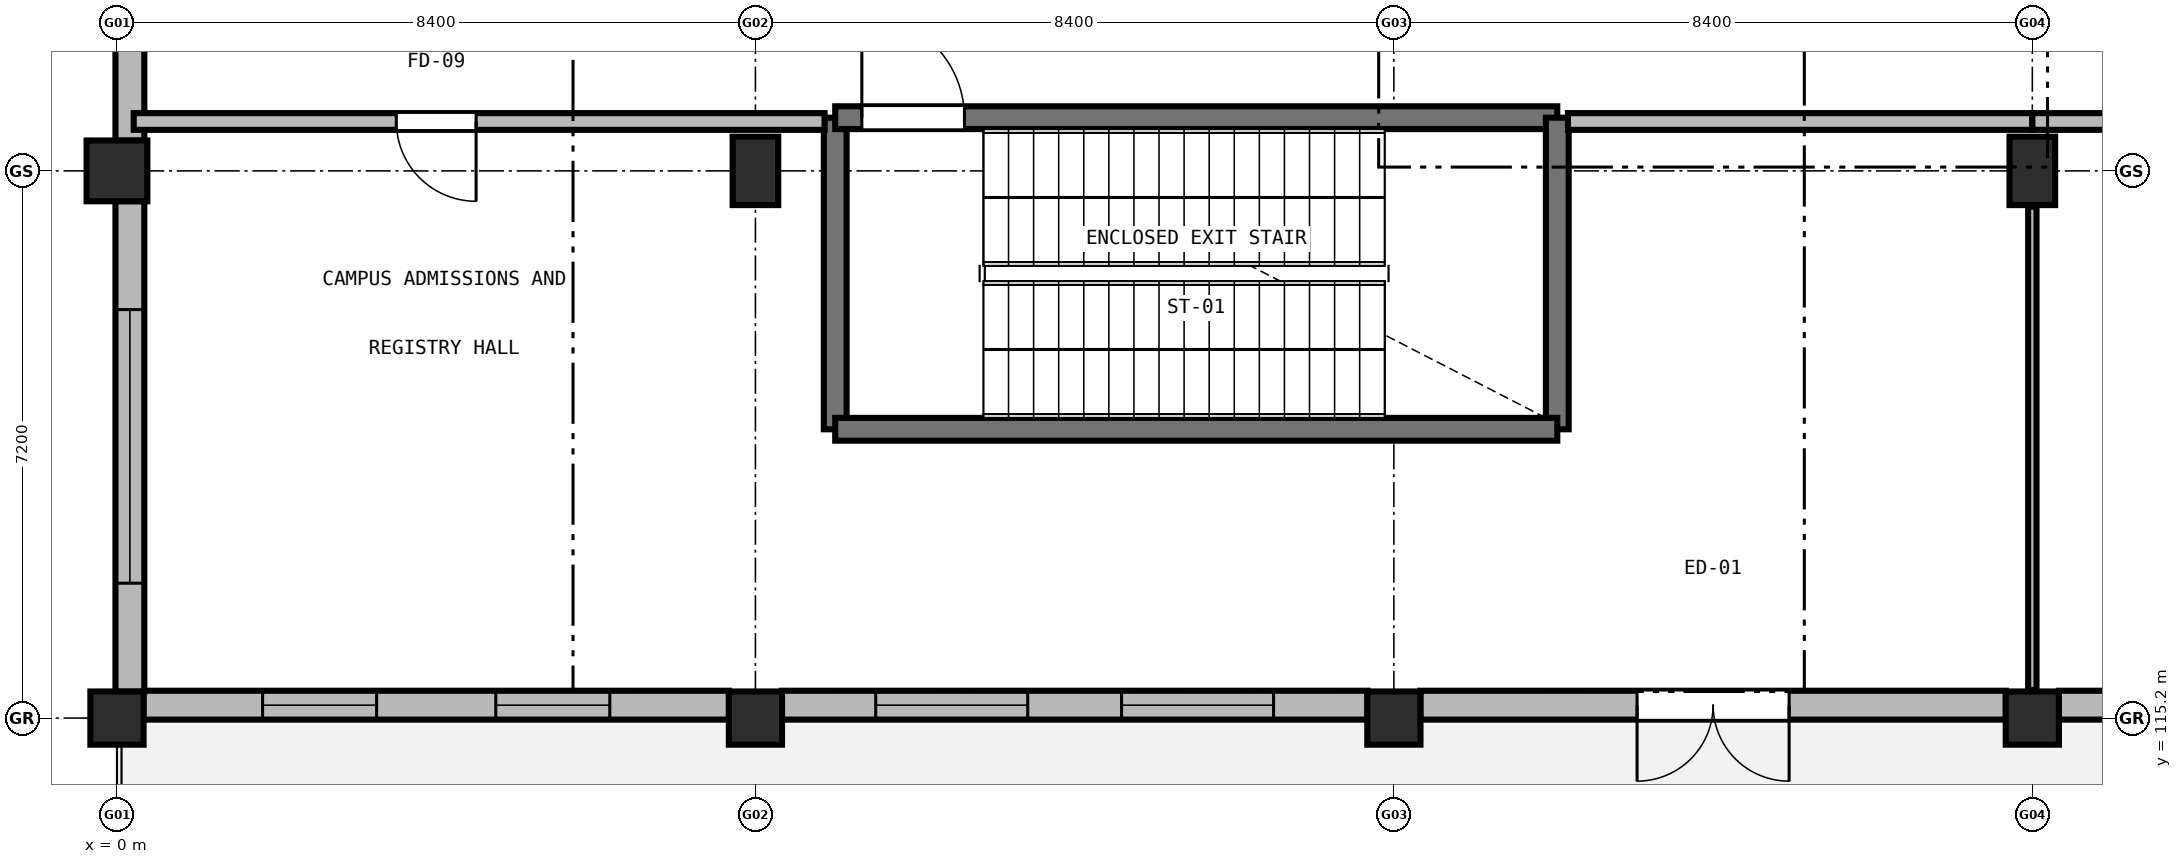
"""IFC4 building model, lengths in metres.
Left out: names, types, materials, properties, quantities, classifications, styles, units other than length and angle.
Written with IfcOpenShell. Run it as: python <this file> out.ifc"""

import sys

from ifc_helpers import new_model, si_unit, direction, frame, frame_2d, origin, origin_2d, place, context, subcontext, project, spatial, rectangle, extrude, element, fill, save


model = new_model("IFC4")
c1 = context("Model", 3, precision=1e-05, world=origin(), true_north=direction((0.0, 1.0)))
c2 = subcontext(c1, "Body", "Model", "MODEL_VIEW")
j1 = project(units=[si_unit("LENGTHUNIT", "METRE"), si_unit("PLANEANGLEUNIT", "RADIAN")], contexts=[c1])
p1 = place(None, origin())
s1 = spatial("IfcSite", under=j1, at=p1, CompositionType="ELEMENT")
p2 = place(p1, origin())
s2 = spatial("IfcBuilding", under=s1, at=p2, CompositionType="ELEMENT")
p3 = place(p2, origin())
s3 = spatial("IfcBuildingStorey", under=s2, at=p3, CompositionType="ELEMENT", Elevation=0.0)
p4 = place(p3, frame((0.0, 115.2, 0.0), z_axis=(0.0, 0.0, 1.0), x_axis=(1.0, 0.0, 0.0)))
e1 = element("IfcColumn", 1, at=p4, inside=s3, PredefinedType="COLUMN", context=c2, shape_type="SweptSolid", body=[
    extrude(rectangle(XDim=0.7, YDim=0.7, at=origin_2d()), origin(), (0.0, 0.0, 1.0), 5.1),
])
p5 = place(p3, frame((0.0, 122.4, 0.0), z_axis=(0.0, 0.0, 1.0), x_axis=(1.0, 0.0, 0.0)))
e2 = element("IfcColumn", 2, at=p5, inside=s3, PredefinedType="COLUMN", context=c2, shape_type="SweptSolid", body=[
    extrude(rectangle(XDim=0.8, YDim=0.8, at=origin_2d()), origin(), (0.0, 0.0, 1.0), 5.1),
])
p6 = place(p3, frame((8.4, 115.2, 0.0), z_axis=(0.0, 0.0, 1.0), x_axis=(1.0, 0.0, 0.0)))
e3 = element("IfcColumn", 3, at=p6, inside=s3, PredefinedType="COLUMN", context=c2, shape_type="SweptSolid", body=[
    extrude(rectangle(XDim=0.7, YDim=0.7, at=origin_2d()), origin(), (0.0, 0.0, 1.0), 5.1),
])
p7 = place(p3, frame((8.4, 122.4, 0.0), z_axis=(0.0, 0.0, 1.0), x_axis=(1.0, 0.0, 0.0)))
e4 = element("IfcColumn", 4, at=p7, inside=s3, PredefinedType="COLUMN", context=c2, shape_type="SweptSolid", body=[
    extrude(rectangle(XDim=0.6, YDim=0.9, at=origin_2d()), origin(), (0.0, 0.0, 1.0), 5.1),
])
for number, where, z_axis, x_axis in (
    (5, (16.8, 115.2, 0.0), (0.0, 0.0, 1.0), (1.0, 0.0, 0.0)),
    (6, (25.2, 115.2, 0.0), (0.0, 0.0, 1.0), (1.0, 0.0, 0.0)),
):
    element("IfcColumn", number, at=place(p3, frame(where, z_axis=z_axis, x_axis=x_axis)), inside=s3, PredefinedType="COLUMN", context=c2, shape_type="SweptSolid", body=[
        extrude(rectangle(XDim=0.7, YDim=0.7, at=origin_2d()), origin(), (0.0, 0.0, 1.0), 5.1),
    ])
p8 = place(p3, frame((25.2, 122.4, 0.0), z_axis=(0.0, 0.0, 1.0), x_axis=(1.0, 0.0, 0.0)))
e7 = element("IfcColumn", 7, at=p8, inside=s3, PredefinedType="COLUMN", context=c2, shape_type="SweptSolid", body=[
    extrude(rectangle(XDim=0.6, YDim=0.9, at=origin_2d()), origin(), (0.0, 0.0, 1.0), 5.1),
])
p9 = place(p3, frame((33.252, 115.37, 0.0), z_axis=(0.0, 0.0, 1.0), x_axis=(-1.0, 0.0, 0.0)))
e8 = element("IfcWall", 8, at=p9, inside=s3, PredefinedType="SOLIDWALL", context=c2, shape_type="SweptSolid", body=[
    extrude(rectangle(XDim=7.704, YDim=0.38, at=frame_2d((3.852, 0.0))), origin(), (0.0, 0.0, 1.0), 4.01),
])
p10 = place(p9, frame((0.85, 0.0, 0.95)))
e9 = element("IfcOpeningElement", 9, at=p10, cuts=e8, PredefinedType="OPENING", context=c2, shape_type="SweptSolid", body=[
    extrude(rectangle(XDim=2.6, YDim=1.8, at=frame_2d((1.3, 0.9))), frame((0.0, 0.2, 0.0), z_axis=(0.0, -1.0, 0.0), x_axis=(1.0, 0.0, 0.0)), (0.0, 0.0, 1.0), 0.4),
])
p11 = place(p9, frame((4.254, 0.0, 0.95)))
e10 = element("IfcOpeningElement", 10, at=p11, cuts=e8, PredefinedType="OPENING", context=c2, shape_type="SweptSolid", body=[
    extrude(rectangle(XDim=2.6, YDim=1.8, at=frame_2d((1.3, 0.9))), frame((0.0, 0.2, 0.0), z_axis=(0.0, -1.0, 0.0), x_axis=(1.0, 0.0, 0.0)), (0.0, 0.0, 1.0), 0.4),
])
p12 = place(p3, frame((24.852, 115.37, 0.0), z_axis=(0.0, 0.0, 1.0), x_axis=(-1.0, 0.0, 0.0)))
e11 = element("IfcWall", 11, at=p12, inside=s3, PredefinedType="SOLIDWALL", context=c2, shape_type="SweptSolid", body=[
    extrude(rectangle(XDim=7.704, YDim=0.38, at=frame_2d((3.852, 0.0))), origin(), (0.0, 0.0, 1.0), 4.01),
])
p13 = place(p12, frame((2.852, 0.0, 0.0)))
e12 = element("IfcOpeningElement", 12, at=p13, cuts=e11, PredefinedType="OPENING", context=c2, shape_type="SweptSolid", body=[
    extrude(rectangle(XDim=2.0, YDim=2.4, at=frame_2d((1.0, 1.2))), frame((0.0, 0.2, 0.0), z_axis=(0.0, -1.0, 0.0), x_axis=(1.0, 0.0, 0.0)), (0.0, 0.0, 1.0), 0.4),
])
p14 = place(p3, frame((16.452, 115.37, 0.0), z_axis=(0.0, 0.0, 1.0), x_axis=(-1.0, 0.0, 0.0)))
e13 = element("IfcWall", 13, at=p14, inside=s3, PredefinedType="SOLIDWALL", context=c2, shape_type="SweptSolid", body=[
    extrude(rectangle(XDim=7.704, YDim=0.38, at=frame_2d((3.852, 0.0))), origin(), (0.0, 0.0, 1.0), 4.01),
])
p15 = place(p14, frame((1.235, 0.0, 0.95)))
e14 = element("IfcOpeningElement", 14, at=p15, cuts=e13, PredefinedType="OPENING", context=c2, shape_type="SweptSolid", body=[
    extrude(rectangle(XDim=2.0, YDim=1.5, at=frame_2d((1.0, 0.75))), frame((0.0, 0.2, 0.0), z_axis=(0.0, -1.0, 0.0), x_axis=(1.0, 0.0, 0.0)), (0.0, 0.0, 1.0), 0.4),
])
p16 = place(p14, frame((4.469, 0.0, 0.95)))
e15 = element("IfcOpeningElement", 15, at=p16, cuts=e13, PredefinedType="OPENING", context=c2, shape_type="SweptSolid", body=[
    extrude(rectangle(XDim=2.0, YDim=1.5, at=frame_2d((1.0, 0.75))), frame((0.0, 0.2, 0.0), z_axis=(0.0, -1.0, 0.0), x_axis=(1.0, 0.0, 0.0)), (0.0, 0.0, 1.0), 0.4),
])
p17 = place(p3, frame((8.052, 115.37, 0.0), z_axis=(0.0, 0.0, 1.0), x_axis=(-1.0, 0.0, 0.0)))
e16 = element("IfcWall", 16, at=p17, inside=s3, PredefinedType="SOLIDWALL", context=c2, shape_type="SweptSolid", body=[
    extrude(rectangle(XDim=7.704, YDim=0.38, at=frame_2d((3.852, 0.0))), origin(), (0.0, 0.0, 1.0), 4.01),
])
p18 = place(p17, frame((1.568, 0.0, 0.95)))
e17 = element("IfcOpeningElement", 17, at=p18, cuts=e16, PredefinedType="OPENING", context=c2, shape_type="SweptSolid", body=[
    extrude(rectangle(XDim=1.5, YDim=1.4, at=frame_2d((0.75, 0.7))), frame((0.0, 0.2, 0.0), z_axis=(0.0, -1.0, 0.0), x_axis=(1.0, 0.0, 0.0)), (0.0, 0.0, 1.0), 0.4),
])
p19 = place(p17, frame((4.636, 0.0, 0.95)))
e18 = element("IfcOpeningElement", 18, at=p19, cuts=e16, PredefinedType="OPENING", context=c2, shape_type="SweptSolid", body=[
    extrude(rectangle(XDim=1.5, YDim=1.4, at=frame_2d((0.75, 0.7))), frame((0.0, 0.2, 0.0), z_axis=(0.0, -1.0, 0.0), x_axis=(1.0, 0.0, 0.0)), (0.0, 0.0, 1.0), 0.4),
])
p20 = place(p3, frame((0.17, 115.548, 0.0), z_axis=(0.0, 0.0, 1.0), x_axis=(0.0, 1.0, 0.0)))
e19 = element("IfcWall", 19, at=p20, inside=s3, PredefinedType="SOLIDWALL", context=c2, shape_type="SweptSolid", body=[
    extrude(rectangle(XDim=6.454, YDim=0.38, at=frame_2d((3.227, 0.0))), origin(), (0.0, 0.0, 1.0), 4.11),
])
p21 = place(p20, frame((1.427, 0.0, 0.95)))
e20 = element("IfcOpeningElement", 20, at=p21, cuts=e19, PredefinedType="OPENING", context=c2, shape_type="SweptSolid", body=[
    extrude(rectangle(XDim=3.6, YDim=2.1, at=frame_2d((1.8, 1.05))), frame((0.0, 0.2, 0.0), z_axis=(0.0, -1.0, 0.0), x_axis=(1.0, 0.0, 0.0)), (0.0, 0.0, 1.0), 0.4),
])
p22 = place(p3, frame((0.17, 122.798, 0.0), z_axis=(0.0, 0.0, 1.0), x_axis=(0.0, 1.0, 0.0)))
e21 = element("IfcWall", 21, at=p22, inside=s3, PredefinedType="SOLIDWALL", context=c2, shape_type="SweptSolid", body=[
    extrude(rectangle(XDim=6.404, YDim=0.38, at=frame_2d((3.202, 0.0))), origin(), (0.0, 0.0, 1.0), 4.11),
])
p23 = place(p3, frame((9.45, 119.0, 0.0), z_axis=(0.0, 0.0, 1.0), x_axis=(0.0, 1.0, 0.0)))
e22 = element("IfcWall", 22, at=p23, inside=s3, PredefinedType="SHEAR", context=c2, shape_type="SweptSolid", body=[
    extrude(rectangle(XDim=4.1, YDim=0.3, at=frame_2d((2.05, 0.0))), origin(), (0.0, 0.0, 1.0), 4.82),
])
p24 = place(p3, frame((9.45, 123.1, 0.0), z_axis=(0.0, 0.0, 1.0), x_axis=(1.0, 0.0, 0.0)))
e23 = element("IfcWall", 23, at=p24, inside=s3, PredefinedType="SHEAR", context=c2, shape_type="SweptSolid", body=[
    extrude(rectangle(XDim=9.5, YDim=0.3, at=frame_2d((4.75, 0.0))), origin(), (0.0, 0.0, 1.0), 4.82),
])
p25 = place(p24, frame((0.35, 0.0, 0.0)))
e24 = element("IfcOpeningElement", 24, at=p25, cuts=e23, PredefinedType="OPENING", context=c2, shape_type="SweptSolid", body=[
    extrude(rectangle(XDim=1.35, YDim=2.2, at=frame_2d((0.675, 1.1))), frame((0.0, 0.16, 0.0), z_axis=(0.0, -1.0, 0.0), x_axis=(1.0, 0.0, 0.0)), (0.0, 0.0, 1.0), 0.32),
])
p26 = place(p3, frame((18.95, 123.1, 0.0), z_axis=(0.0, 0.0, 1.0), x_axis=(0.0, -1.0, 0.0)))
e25 = element("IfcWall", 25, at=p26, inside=s3, PredefinedType="SHEAR", context=c2, shape_type="SweptSolid", body=[
    extrude(rectangle(XDim=4.1, YDim=0.3, at=frame_2d((2.05, 0.0))), origin(), (0.0, 0.0, 1.0), 4.82),
])
p27 = place(p3, frame((18.95, 119.0, 0.0), z_axis=(0.0, 0.0, 1.0), x_axis=(-1.0, 0.0, 0.0)))
e26 = element("IfcWall", 26, at=p27, inside=s3, PredefinedType="SHEAR", context=c2, shape_type="SweptSolid", body=[
    extrude(rectangle(XDim=9.5, YDim=0.3, at=frame_2d((4.75, 0.0))), origin(), (0.0, 0.0, 1.0), 4.82),
])
p28 = place(p3, frame((25.2, 123.05, 0.0), z_axis=(0.0, 0.0, 1.0), x_axis=(-1.0, 0.0, 0.0)))
e27 = element("IfcWall", 27, at=p28, inside=s3, PredefinedType="SOLIDWALL", context=c2, shape_type="SweptSolid", body=[
    extrude(rectangle(XDim=6.11, YDim=0.22, at=frame_2d((3.055, 0.0))), origin(), (0.0, 0.0, 1.0), 4.105),
])
p29 = place(p3, frame((9.31, 123.05, 0.0), z_axis=(0.0, 0.0, 1.0), x_axis=(-1.0, 0.0, 0.0)))
e28 = element("IfcWall", 28, at=p29, inside=s3, PredefinedType="SOLIDWALL", context=c2, shape_type="SweptSolid", body=[
    extrude(rectangle(XDim=9.09, YDim=0.22, at=frame_2d((4.545, 0.0))), origin(), (0.0, 0.0, 1.0), 4.105),
])
p30 = place(p29, frame((4.585, 0.0, 0.0)))
e29 = element("IfcOpeningElement", 29, at=p30, cuts=e28, PredefinedType="OPENING", context=c2, shape_type="SweptSolid", body=[
    extrude(rectangle(XDim=1.05, YDim=2.15, at=frame_2d((0.525, 1.075))), frame((0.0, 0.12, 0.0), z_axis=(0.0, -1.0, 0.0), x_axis=(1.0, 0.0, 0.0)), (0.0, 0.0, 1.0), 0.24),
])
p31 = place(p3, frame((25.2, 115.57, 0.0), z_axis=(0.0, 0.0, 1.0), x_axis=(0.0, 1.0, 0.0)))
e30 = element("IfcWall", 30, at=p31, inside=s3, PredefinedType="PARTITIONING", context=c2, shape_type="SweptSolid", body=[
    extrude(rectangle(XDim=6.36, YDim=0.11, at=frame_2d((3.18, 0.0))), origin(), (0.0, 0.0, 1.0), 4.005),
])
p32 = place(p3, frame((33.6, 123.05, 0.0), z_axis=(0.0, 0.0, 1.0), x_axis=(-1.0, 0.0, 0.0)))
e31 = element("IfcWall", 31, at=p32, inside=s3, PredefinedType="SOLIDWALL", context=c2, shape_type="SweptSolid", body=[
    extrude(rectangle(XDim=8.4, YDim=0.22, at=frame_2d((4.2, 0.0))), origin(), (0.0, 0.0, 1.0), 4.105),
])
p33 = place(p32, frame((3.7, 0.0, 0.0)))
e32 = element("IfcOpeningElement", 32, at=p33, cuts=e31, PredefinedType="OPENING", context=c2, shape_type="SweptSolid", body=[
    extrude(rectangle(XDim=1.0, YDim=2.1, at=frame_2d((0.5, 1.05))), frame((0.0, 0.12, 0.0), z_axis=(0.0, -1.0, 0.0), x_axis=(1.0, 0.0, 0.0)), (0.0, 0.0, 1.0), 0.24),
])
p34 = place(p13, origin())
e33 = element("IfcDoor", 33, at=p34, inside=s3, OperationType="DOUBLE_DOOR_SINGLE_SWING", PredefinedType="DOOR", context=c2, shape_type="SweptSolid", body=[
    extrude(rectangle(XDim=2.0, YDim=2.4, at=frame_2d((1.0, 1.2))), frame((0.0, 0.025, 0.0), z_axis=(0.0, -1.0, 0.0), x_axis=(1.0, 0.0, 0.0)), (0.0, 0.0, 1.0), 0.05),
])
fill(e12, e33)
p35 = place(p15, origin())
e34 = element("IfcWindow", 34, at=p35, inside=s3, PartitioningType="SINGLE_PANEL", PredefinedType="WINDOW", context=c2, shape_type="SweptSolid", body=[
    extrude(rectangle(XDim=2.0, YDim=1.5, at=frame_2d((1.0, 0.75))), frame((0.0, 0.03, 0.0), z_axis=(0.0, -1.0, 0.0), x_axis=(1.0, 0.0, 0.0)), (0.0, 0.0, 1.0), 0.06),
])
fill(e14, e34)
p36 = place(p16, origin())
e35 = element("IfcWindow", 35, at=p36, inside=s3, PartitioningType="SINGLE_PANEL", PredefinedType="WINDOW", context=c2, shape_type="SweptSolid", body=[
    extrude(rectangle(XDim=2.0, YDim=1.5, at=frame_2d((1.0, 0.75))), frame((0.0, 0.03, 0.0), z_axis=(0.0, -1.0, 0.0), x_axis=(1.0, 0.0, 0.0)), (0.0, 0.0, 1.0), 0.06),
])
fill(e15, e35)
p37 = place(p18, origin())
e36 = element("IfcWindow", 36, at=p37, inside=s3, PartitioningType="SINGLE_PANEL", PredefinedType="WINDOW", context=c2, shape_type="SweptSolid", body=[
    extrude(rectangle(XDim=1.5, YDim=1.4, at=frame_2d((0.75, 0.7))), frame((0.0, 0.03, 0.0), z_axis=(0.0, -1.0, 0.0), x_axis=(1.0, 0.0, 0.0)), (0.0, 0.0, 1.0), 0.06),
])
fill(e17, e36)
p38 = place(p19, origin())
e37 = element("IfcWindow", 37, at=p38, inside=s3, PartitioningType="SINGLE_PANEL", PredefinedType="WINDOW", context=c2, shape_type="SweptSolid", body=[
    extrude(rectangle(XDim=1.5, YDim=1.4, at=frame_2d((0.75, 0.7))), frame((0.0, 0.03, 0.0), z_axis=(0.0, -1.0, 0.0), x_axis=(1.0, 0.0, 0.0)), (0.0, 0.0, 1.0), 0.06),
])
fill(e18, e37)
p39 = place(p21, origin())
e38 = element("IfcWindow", 38, at=p39, inside=s3, PartitioningType="SINGLE_PANEL", PredefinedType="WINDOW", context=c2, shape_type="SweptSolid", body=[
    extrude(rectangle(XDim=3.6, YDim=2.1, at=frame_2d((1.8, 1.05))), frame((0.0, 0.03, 0.0), z_axis=(0.0, -1.0, 0.0), x_axis=(1.0, 0.0, 0.0)), (0.0, 0.0, 1.0), 0.06),
])
fill(e20, e38)
p40 = place(p25, origin())
e39 = element("IfcDoor", 39, at=p40, inside=s3, OperationType="SINGLE_SWING_LEFT", PredefinedType="DOOR", context=c2, shape_type="SweptSolid", body=[
    extrude(rectangle(XDim=1.35, YDim=2.2, at=frame_2d((0.675, 1.1))), frame((0.0, 0.025, 0.0), z_axis=(0.0, -1.0, 0.0), x_axis=(1.0, 0.0, 0.0)), (0.0, 0.0, 1.0), 0.05),
])
fill(e24, e39)
p41 = place(p30, origin())
e40 = element("IfcDoor", 40, at=p41, inside=s3, OperationType="SINGLE_SWING_LEFT", PredefinedType="DOOR", context=c2, shape_type="SweptSolid", body=[
    extrude(rectangle(XDim=1.05, YDim=2.15, at=frame_2d((0.525, 1.075))), frame((0.0, 0.025, 0.0), z_axis=(0.0, -1.0, 0.0), x_axis=(1.0, 0.0, 0.0)), (0.0, 0.0, 1.0), 0.05),
])
fill(e29, e40)
save(model, sys.argv[1])
